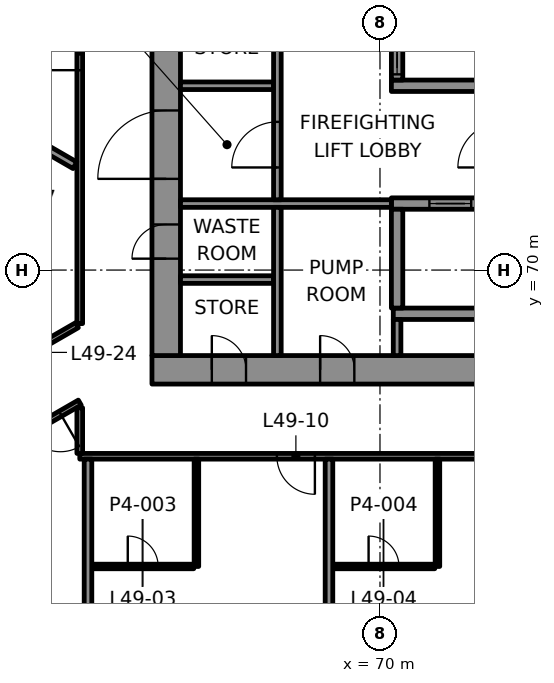
"""IFC4 building model, lengths in metres.
Left out: names, types, materials, properties, quantities, classifications, styles, units other than length and angle.
Written with IfcOpenShell. Run it as: python <this file> out.ifc"""

import sys

from ifc_helpers import new_model, si_unit, direction, frame, frame_2d, origin, place, context, subcontext, project, spatial, rectangle, extrude, element, fill, save


model = new_model("IFC4")
c1 = context("Model", 3, precision=1e-05, world=origin(), true_north=direction((0.0, 1.0)))
c2 = subcontext(c1, "Body", "Model", "MODEL_VIEW")
j1 = project(units=[si_unit("LENGTHUNIT", "METRE"), si_unit("PLANEANGLEUNIT", "RADIAN")], contexts=[c1])
p1 = place(None, origin())
s1 = spatial("IfcSite", under=j1, at=p1, CompositionType="ELEMENT")
p2 = place(p1, origin())
s2 = spatial("IfcBuilding", under=s1, at=p2, CompositionType="ELEMENT")
p3 = place(p2, frame((0.0, 0.0, 210.4)))
s3 = spatial("IfcBuildingStorey", under=s2, at=p3, CompositionType="ELEMENT", Elevation=210.4)
p4 = place(p3, frame((64.0, 67.375, 0.0), z_axis=(0.0, 0.0, 1.0), x_axis=(1.0, 0.0, 0.0)))
e1 = element("IfcWall", 1, at=p4, inside=s3, PredefinedType="SHEAR", context=c2, shape_type="SweptSolid", body=[
    extrude(rectangle(XDim=22.0, YDim=0.75, at=frame_2d((11.0, 0.0))), origin(), (0.0, 0.0, 1.0), 3.7),
])
p5 = place(p4, frame((1.575, 0.0, 0.0)))
e2 = element("IfcOpeningElement", 2, at=p5, cuts=e1, PredefinedType="OPENING", context=c2, shape_type="SweptSolid", body=[
    extrude(rectangle(XDim=0.9, YDim=2.1, at=frame_2d((0.45, 1.05))), frame((0.0, 0.385, 0.0), z_axis=(0.0, -1.0, 0.0), x_axis=(1.0, 0.0, 0.0)), (0.0, 0.0, 1.0), 0.77),
])
p6 = place(p4, frame((4.425, 0.0, 0.0)))
e3 = element("IfcOpeningElement", 3, at=p6, cuts=e1, PredefinedType="OPENING", context=c2, shape_type="SweptSolid", body=[
    extrude(rectangle(XDim=0.9, YDim=2.1, at=frame_2d((0.45, 1.05))), frame((0.0, 0.385, 0.0), z_axis=(0.0, -1.0, 0.0), x_axis=(1.0, 0.0, 0.0)), (0.0, 0.0, 1.0), 0.77),
])
p7 = place(p3, frame((64.375, 67.75, 0.0), z_axis=(0.0, 0.0, 1.0), x_axis=(0.0, 1.0, 0.0)))
e4 = element("IfcWall", 4, at=p7, inside=s3, PredefinedType="SHEAR", context=c2, shape_type="SweptSolid", body=[
    extrude(rectangle(XDim=14.5, YDim=0.75, at=frame_2d((7.25, 0.0))), origin(), (0.0, 0.0, 1.0), 3.7),
])
p8 = place(p7, frame((4.65, 0.0, 0.0)))
e5 = element("IfcOpeningElement", 5, at=p8, cuts=e4, PredefinedType="OPENING", context=c2, shape_type="SweptSolid", body=[
    extrude(rectangle(XDim=1.8, YDim=2.1, at=frame_2d((0.9, 1.05))), frame((0.0, 0.385, 0.0), z_axis=(0.0, -1.0, 0.0), x_axis=(1.0, 0.0, 0.0)), (0.0, 0.0, 1.0), 0.77),
])
p9 = place(p7, frame((2.55, 0.0, 0.0)))
e6 = element("IfcOpeningElement", 6, at=p9, cuts=e4, PredefinedType="OPENING", context=c2, shape_type="SweptSolid", body=[
    extrude(rectangle(XDim=0.9, YDim=2.1, at=frame_2d((0.45, 1.05))), frame((0.0, 0.385, 0.0), z_axis=(0.0, -1.0, 0.0), x_axis=(1.0, 0.0, 0.0)), (0.0, 0.0, 1.0), 0.77),
])
p10 = place(p7, frame((10.35, 0.0, 0.0)))
e7 = element("IfcOpeningElement", 7, at=p10, cuts=e4, PredefinedType="OPENING", context=c2, shape_type="SweptSolid", body=[
    extrude(rectangle(XDim=0.9, YDim=2.1, at=frame_2d((0.45, 1.05))), frame((0.0, 0.385, 0.0), z_axis=(0.0, -1.0, 0.0), x_axis=(1.0, 0.0, 0.0)), (0.0, 0.0, 1.0), 0.77),
])
p11 = place(p3, frame((70.35, 68.85, 0.0), z_axis=(0.0, 0.0, 1.0), x_axis=(1.0, 0.0, 0.0)))
e8 = element("IfcWall", 8, at=p11, inside=s3, PredefinedType="SHEAR", context=c2, shape_type="SweptSolid", body=[
    extrude(rectangle(XDim=14.2, YDim=0.3, at=frame_2d((7.1, 0.0))), origin(), (0.0, 0.0, 1.0), 3.7),
])
p12 = place(p3, frame((70.3, 71.75, 0.0), z_axis=(0.0, 0.0, 1.0), x_axis=(1.0, 0.0, 0.0)))
e9 = element("IfcWall", 9, at=p12, inside=s3, PredefinedType="SHEAR", context=c2, shape_type="SweptSolid", body=[
    extrude(rectangle(XDim=14.3, YDim=0.3, at=frame_2d((7.15, 0.0))), origin(), (0.0, 0.0, 1.0), 3.7),
])
p13 = place(p12, frame((1.0, 0.0, 0.0)))
e10 = element("IfcOpeningElement", 10, at=p13, cuts=e9, PredefinedType="OPENING", context=c2, shape_type="SweptSolid", body=[
    extrude(rectangle(XDim=1.1, YDim=2.1, at=frame_2d((0.55, 1.05))), frame((0.0, 0.16, 0.0), z_axis=(0.0, -1.0, 0.0), x_axis=(1.0, 0.0, 0.0)), (0.0, 0.0, 1.0), 0.32),
])
p14 = place(p12, frame((3.8, 0.0, 0.0)))
e11 = element("IfcOpeningElement", 11, at=p14, cuts=e9, PredefinedType="OPENING", context=c2, shape_type="SweptSolid", body=[
    extrude(rectangle(XDim=1.1, YDim=2.1, at=frame_2d((0.55, 1.05))), frame((0.0, 0.16, 0.0), z_axis=(0.0, -1.0, 0.0), x_axis=(1.0, 0.0, 0.0)), (0.0, 0.0, 1.0), 0.32),
])
p15 = place(p12, frame((6.6, 0.0, 0.0)))
e12 = element("IfcOpeningElement", 12, at=p15, cuts=e9, PredefinedType="OPENING", context=c2, shape_type="SweptSolid", body=[
    extrude(rectangle(XDim=1.1, YDim=2.1, at=frame_2d((0.55, 1.05))), frame((0.0, 0.16, 0.0), z_axis=(0.0, -1.0, 0.0), x_axis=(1.0, 0.0, 0.0)), (0.0, 0.0, 1.0), 0.32),
])
p16 = place(p12, frame((9.4, 0.0, 0.0)))
e13 = element("IfcOpeningElement", 13, at=p16, cuts=e9, PredefinedType="OPENING", context=c2, shape_type="SweptSolid", body=[
    extrude(rectangle(XDim=1.1, YDim=2.1, at=frame_2d((0.55, 1.05))), frame((0.0, 0.16, 0.0), z_axis=(0.0, -1.0, 0.0), x_axis=(1.0, 0.0, 0.0)), (0.0, 0.0, 1.0), 0.32),
])
p17 = place(p12, frame((12.2, 0.0, 0.0)))
e14 = element("IfcOpeningElement", 14, at=p17, cuts=e9, PredefinedType="OPENING", context=c2, shape_type="SweptSolid", body=[
    extrude(rectangle(XDim=1.1, YDim=2.1, at=frame_2d((0.55, 1.05))), frame((0.0, 0.16, 0.0), z_axis=(0.0, -1.0, 0.0), x_axis=(1.0, 0.0, 0.0)), (0.0, 0.0, 1.0), 0.32),
])
p18 = place(p3, frame((70.3, 74.85, 0.0), z_axis=(0.0, 0.0, 1.0), x_axis=(1.0, 0.0, 0.0)))
e15 = element("IfcWall", 15, at=p18, inside=s3, PredefinedType="SHEAR", context=c2, shape_type="SweptSolid", body=[
    extrude(rectangle(XDim=14.3, YDim=0.3, at=frame_2d((7.15, 0.0))), origin(), (0.0, 0.0, 1.0), 3.7),
])
p19 = place(p18, frame((3.8, 0.0, 0.0)))
e16 = element("IfcOpeningElement", 16, at=p19, cuts=e15, PredefinedType="OPENING", context=c2, shape_type="SweptSolid", body=[
    extrude(rectangle(XDim=1.1, YDim=2.1, at=frame_2d((0.55, 1.05))), frame((0.0, 0.16, 0.0), z_axis=(0.0, -1.0, 0.0), x_axis=(1.0, 0.0, 0.0)), (0.0, 0.0, 1.0), 0.32),
])
p20 = place(p18, frame((12.2, 0.0, 0.0)))
e17 = element("IfcOpeningElement", 17, at=p20, cuts=e15, PredefinedType="OPENING", context=c2, shape_type="SweptSolid", body=[
    extrude(rectangle(XDim=1.1, YDim=2.1, at=frame_2d((0.55, 1.05))), frame((0.0, 0.16, 0.0), z_axis=(0.0, -1.0, 0.0), x_axis=(1.0, 0.0, 0.0)), (0.0, 0.0, 1.0), 0.32),
])
p21 = place(p3, frame((70.45, 69.0, 0.0), z_axis=(0.0, 0.0, 1.0), x_axis=(0.0, 1.0, 0.0)))
e18 = element("IfcWall", 18, at=p21, inside=s3, PredefinedType="SHEAR", context=c2, shape_type="SweptSolid", body=[
    extrude(rectangle(XDim=2.6, YDim=0.3, at=frame_2d((1.3, 0.0))), origin(), (0.0, 0.0, 1.0), 3.7),
])
p22 = place(p3, frame((70.45, 75.0, 0.0), z_axis=(0.0, 0.0, 1.0), x_axis=(0.0, 1.0, 0.0)))
e19 = element("IfcWall", 19, at=p22, inside=s3, PredefinedType="SHEAR", context=c2, shape_type="SweptSolid", body=[
    extrude(rectangle(XDim=2.6, YDim=0.3, at=frame_2d((1.3, 0.0))), origin(), (0.0, 0.0, 1.0), 3.7),
])
p23 = place(p22, frame((0.15, 0.0, 0.0)))
e20 = element("IfcOpeningElement", 20, at=p23, cuts=e19, PredefinedType="OPENING", context=c2, shape_type="SweptSolid", body=[
    extrude(rectangle(XDim=1.1, YDim=2.1, at=frame_2d((0.55, 1.05))), frame((0.0, 0.16, 0.0), z_axis=(0.0, -1.0, 0.0), x_axis=(1.0, 0.0, 0.0)), (0.0, 0.0, 1.0), 0.32),
])
p24 = place(p3, frame((62.427, 62.2, 0.0), z_axis=(0.0, 0.0, 1.0), x_axis=(1.0, 0.0, 0.0)))
e21 = element("IfcWall", 21, at=p24, inside=s3, PredefinedType="PARTITIONING", context=c2, shape_type="SweptSolid", body=[
    extrude(rectangle(XDim=2.674, YDim=0.12, at=frame_2d((1.337, 0.0))), origin(), (0.0, 0.0, 1.0), 3.1),
])
p25 = place(p24, frame((0.937, 0.0, 0.0)))
e22 = element("IfcOpeningElement", 22, at=p25, cuts=e21, PredefinedType="OPENING", context=c2, shape_type="SweptSolid", body=[
    extrude(rectangle(XDim=0.8, YDim=2.1, at=frame_2d((0.4, 1.05))), frame((0.0, 0.07, 0.0), z_axis=(0.0, -1.0, 0.0), x_axis=(1.0, 0.0, 0.0)), (0.0, 0.0, 1.0), 0.14),
])
p26 = place(p3, frame((68.758, 62.2, 0.0), z_axis=(0.0, 0.0, 1.0), x_axis=(1.0, 0.0, 0.0)))
e23 = element("IfcWall", 23, at=p26, inside=s3, PredefinedType="PARTITIONING", context=c2, shape_type="SweptSolid", body=[
    extrude(rectangle(XDim=2.684, YDim=0.12, at=frame_2d((1.342, 0.0))), origin(), (0.0, 0.0, 1.0), 3.1),
])
p27 = place(p26, frame((0.942, 0.0, 0.0)))
e24 = element("IfcOpeningElement", 24, at=p27, cuts=e23, PredefinedType="OPENING", context=c2, shape_type="SweptSolid", body=[
    extrude(rectangle(XDim=0.8, YDim=2.1, at=frame_2d((0.4, 1.05))), frame((0.0, 0.07, 0.0), z_axis=(0.0, -1.0, 0.0), x_axis=(1.0, 0.0, 0.0)), (0.0, 0.0, 1.0), 0.14),
])
p28 = place(p3, frame((87.899, 65.1, 0.0), z_axis=(0.0, 0.0, 1.0), x_axis=(-1.0, 0.0, 0.0)))
e25 = element("IfcWall", 25, at=p28, inside=s3, PredefinedType="PARTITIONING", context=c2, shape_type="SweptSolid", body=[
    extrude(rectangle(XDim=25.799, YDim=0.15, at=frame_2d((12.899, 0.0))), origin(), (0.0, 0.0, 1.0), 3.1),
])
p29 = place(p28, frame((0.259, 0.0, 0.0)))
e26 = element("IfcOpeningElement", 26, at=p29, cuts=e25, PredefinedType="OPENING", context=c2, shape_type="SweptSolid", body=[
    extrude(rectangle(XDim=1.0, YDim=2.1, at=frame_2d((0.5, 1.05))), frame((0.0, 0.085, 0.0), z_axis=(0.0, -1.0, 0.0), x_axis=(1.0, 0.0, 0.0)), (0.0, 0.0, 1.0), 0.17),
])
p30 = place(p28, frame((4.641, 0.0, 0.0)))
e27 = element("IfcOpeningElement", 27, at=p30, cuts=e25, PredefinedType="OPENING", context=c2, shape_type="SweptSolid", body=[
    extrude(rectangle(XDim=1.0, YDim=2.1, at=frame_2d((0.5, 1.05))), frame((0.0, 0.085, 0.0), z_axis=(0.0, -1.0, 0.0), x_axis=(1.0, 0.0, 0.0)), (0.0, 0.0, 1.0), 0.17),
])
p31 = place(p28, frame((8.868, 0.0, 0.0)))
e28 = element("IfcOpeningElement", 28, at=p31, cuts=e25, PredefinedType="OPENING", context=c2, shape_type="SweptSolid", body=[
    extrude(rectangle(XDim=1.0, YDim=2.1, at=frame_2d((0.5, 1.05))), frame((0.0, 0.085, 0.0), z_axis=(0.0, -1.0, 0.0), x_axis=(1.0, 0.0, 0.0)), (0.0, 0.0, 1.0), 0.17),
])
p32 = place(p28, frame((13.271, 0.0, 0.0)))
e29 = element("IfcOpeningElement", 29, at=p32, cuts=e25, PredefinedType="OPENING", context=c2, shape_type="SweptSolid", body=[
    extrude(rectangle(XDim=1.0, YDim=2.1, at=frame_2d((0.5, 1.05))), frame((0.0, 0.085, 0.0), z_axis=(0.0, -1.0, 0.0), x_axis=(1.0, 0.0, 0.0)), (0.0, 0.0, 1.0), 0.17),
])
p33 = place(p28, frame((19.612, 0.0, 0.0)))
e30 = element("IfcOpeningElement", 30, at=p33, cuts=e25, PredefinedType="OPENING", context=c2, shape_type="SweptSolid", body=[
    extrude(rectangle(XDim=1.0, YDim=2.1, at=frame_2d((0.5, 1.05))), frame((0.0, 0.085, 0.0), z_axis=(0.0, -1.0, 0.0), x_axis=(1.0, 0.0, 0.0)), (0.0, 0.0, 1.0), 0.17),
])
p34 = place(p3, frame((62.1, 66.513, 0.0), z_axis=(0.0, 0.0, 1.0), x_axis=(-0.866025886419, -0.499999164051, 0.0)))
e31 = element("IfcWall", 31, at=p34, inside=s3, PredefinedType="PARTITIONING", context=c2, shape_type="SweptSolid", body=[
    extrude(rectangle(XDim=12.754, YDim=0.15, at=frame_2d((6.377, 0.0))), origin(), (0.0, 0.0, 1.0), 2.947),
])
p35 = place(p34, frame((0.587, 0.0, 0.0)))
e32 = element("IfcOpeningElement", 32, at=p35, cuts=e31, PredefinedType="OPENING", context=c2, shape_type="SweptSolid", body=[
    extrude(rectangle(XDim=1.0, YDim=2.1, at=frame_2d((0.5, 1.05))), frame((0.0, 0.085, 0.0), z_axis=(0.0, -1.0, 0.0), x_axis=(1.0, 0.0, 0.0)), (0.0, 0.0, 1.0), 0.17),
])
p36 = place(p34, frame((7.742, 0.0, 0.0)))
e33 = element("IfcOpeningElement", 33, at=p36, cuts=e31, PredefinedType="OPENING", context=c2, shape_type="SweptSolid", body=[
    extrude(rectangle(XDim=1.0, YDim=2.1, at=frame_2d((0.5, 1.05))), frame((0.0, 0.085, 0.0), z_axis=(0.0, -1.0, 0.0), x_axis=(1.0, 0.0, 0.0)), (0.0, 0.0, 1.0), 0.17),
])
p37 = place(p3, frame((50.155, 61.695, 0.0), z_axis=(0.0, 0.0, 1.0), x_axis=(0.8660236305, 0.500003071406, 0.0)))
e34 = element("IfcWall", 34, at=p37, inside=s3, PredefinedType="PARTITIONING", context=c2, shape_type="SweptSolid", body=[
    extrude(rectangle(XDim=13.707, YDim=0.15, at=frame_2d((6.853, 0.0))), origin(), (0.0, 0.0, 1.0), 3.1),
])
p38 = place(p37, frame((1.736, 0.0, 0.0)))
e35 = element("IfcOpeningElement", 35, at=p38, cuts=e34, PredefinedType="OPENING", context=c2, shape_type="SweptSolid", body=[
    extrude(rectangle(XDim=1.0, YDim=2.1, at=frame_2d((0.5, 1.05))), frame((0.0, 0.085, 0.0), z_axis=(0.0, -1.0, 0.0), x_axis=(1.0, 0.0, 0.0)), (0.0, 0.0, 1.0), 0.17),
])
p39 = place(p37, frame((11.777, 0.0, 0.0)))
e36 = element("IfcOpeningElement", 36, at=p39, cuts=e34, PredefinedType="OPENING", context=c2, shape_type="SweptSolid", body=[
    extrude(rectangle(XDim=1.0, YDim=2.1, at=frame_2d((0.5, 1.05))), frame((0.0, 0.085, 0.0), z_axis=(0.0, -1.0, 0.0), x_axis=(1.0, 0.0, 0.0)), (0.0, 0.0, 1.0), 0.17),
])
p40 = place(p3, frame((71.512, 62.2, 0.0), z_axis=(0.0, 0.0, 1.0), x_axis=(0.0, 1.0, 0.0)))
e37 = element("IfcWall", 37, at=p40, inside=s3, PredefinedType="PARTITIONING", context=c2, shape_type="SweptSolid", body=[
    extrude(rectangle(XDim=2.825, YDim=0.12, at=frame_2d((1.413, 0.0))), origin(), (0.0, 0.0, 1.0), 3.1),
])
p41 = place(p3, frame((68.658, 55.998, 0.0), z_axis=(0.0, 0.0, 1.0), x_axis=(0.0, 1.0, 0.0)))
e38 = element("IfcWall", 38, at=p41, inside=s3, PredefinedType="PARTITIONING", context=c2, shape_type="SweptSolid", body=[
    extrude(rectangle(XDim=9.027, YDim=0.2, at=frame_2d((4.514, 0.0))), origin(), (0.0, 0.0, 1.0), 3.022),
])
p42 = place(p3, frame((65.17, 62.2, 0.0), z_axis=(0.0, 0.0, 1.0), x_axis=(0.0, 1.0, 0.0)))
e39 = element("IfcWall", 39, at=p42, inside=s3, PredefinedType="PARTITIONING", context=c2, shape_type="SweptSolid", body=[
    extrude(rectangle(XDim=2.825, YDim=0.12, at=frame_2d((1.413, 0.0))), origin(), (0.0, 0.0, 1.0), 3.1),
])
p43 = place(p3, frame((62.317, 55.998, 0.0), z_axis=(0.0, 0.0, 1.0), x_axis=(0.0, 1.0, 0.0)))
e40 = element("IfcWall", 40, at=p43, inside=s3, PredefinedType="PARTITIONING", context=c2, shape_type="SweptSolid", body=[
    extrude(rectangle(XDim=9.027, YDim=0.2, at=frame_2d((4.514, 0.0))), origin(), (0.0, 0.0, 1.0), 3.022),
])
p44 = place(p3, frame((62.1, 65.176, 0.0), z_axis=(0.0, 0.0, 1.0), x_axis=(0.0, 1.0, 0.0)))
e41 = element("IfcWall", 41, at=p44, inside=s3, PredefinedType="PARTITIONING", context=c2, shape_type="SweptSolid", body=[
    extrude(rectangle(XDim=1.201, YDim=0.15, at=frame_2d((0.6, 0.0))), origin(), (0.0, 0.0, 1.0), 2.947),
])
p45 = place(p3, frame((62.1, 68.591, 0.0), z_axis=(0.0, 0.0, 1.0), x_axis=(0.0, 1.0, 0.0)))
e42 = element("IfcWall", 42, at=p45, inside=s3, PredefinedType="PARTITIONING", context=c2, shape_type="SweptSolid", body=[
    extrude(rectangle(XDim=16.309, YDim=0.15, at=frame_2d((8.154, 0.0))), origin(), (0.0, 0.0, 1.0), 3.1),
])
p46 = place(p45, frame((6.668, 0.0, 0.0)))
e43 = element("IfcOpeningElement", 43, at=p46, cuts=e42, PredefinedType="OPENING", context=c2, shape_type="SweptSolid", body=[
    extrude(rectangle(XDim=1.0, YDim=2.1, at=frame_2d((0.5, 1.05))), frame((0.0, 0.085, 0.0), z_axis=(0.0, -1.0, 0.0), x_axis=(1.0, 0.0, 0.0)), (0.0, 0.0, 1.0), 0.17),
])
p47 = place(p45, frame((13.991, 0.0, 0.0)))
e44 = element("IfcOpeningElement", 44, at=p47, cuts=e42, PredefinedType="OPENING", context=c2, shape_type="SweptSolid", body=[
    extrude(rectangle(XDim=1.0, YDim=2.1, at=frame_2d((0.5, 1.05))), frame((0.0, 0.085, 0.0), z_axis=(0.0, -1.0, 0.0), x_axis=(1.0, 0.0, 0.0)), (0.0, 0.0, 1.0), 0.17),
])
p48 = place(p3, frame((61.973, 72.757, 0.0), z_axis=(0.0, 0.0, 1.0), x_axis=(-0.866027278279, 0.499996753267, 0.0)))
e45 = element("IfcWall", 45, at=p48, inside=s3, PredefinedType="PARTITIONING", context=c2, shape_type="SweptSolid", body=[
    extrude(rectangle(XDim=7.242, YDim=0.2, at=frame_2d((3.621, 0.0))), origin(), (0.0, 0.0, 1.0), 3.1),
])
p49 = place(p3, frame((64.75, 69.75, 0.0), z_axis=(0.0, 0.0, 1.0), x_axis=(1.0, 0.0, 0.0)))
e46 = element("IfcWall", 46, at=p49, inside=s3, PredefinedType="PARTITIONING", context=c2, shape_type="SweptSolid", body=[
    extrude(rectangle(XDim=2.45, YDim=0.2, at=frame_2d((1.225, 0.0))), origin(), (0.0, 0.0, 1.0), 3.7),
])
p50 = place(p3, frame((64.75, 71.75, 0.0), z_axis=(0.0, 0.0, 1.0), x_axis=(1.0, 0.0, 0.0)))
e47 = element("IfcWall", 47, at=p50, inside=s3, PredefinedType="PARTITIONING", context=c2, shape_type="SweptSolid", body=[
    extrude(rectangle(XDim=5.55, YDim=0.2, at=frame_2d((2.775, 0.0))), origin(), (0.0, 0.0, 1.0), 3.7),
])
p51 = place(p3, frame((64.75, 74.85, 0.0), z_axis=(0.0, 0.0, 1.0), x_axis=(1.0, 0.0, 0.0)))
e48 = element("IfcWall", 48, at=p51, inside=s3, PredefinedType="PARTITIONING", context=c2, shape_type="SweptSolid", body=[
    extrude(rectangle(XDim=2.45, YDim=0.2, at=frame_2d((1.225, 0.0))), origin(), (0.0, 0.0, 1.0), 3.7),
])
p52 = place(p3, frame((67.3, 67.75, 0.0), z_axis=(0.0, 0.0, 1.0), x_axis=(0.0, 1.0, 0.0)))
e49 = element("IfcWall", 49, at=p52, inside=s3, PredefinedType="PARTITIONING", context=c2, shape_type="SweptSolid", body=[
    extrude(rectangle(XDim=3.9, YDim=0.2, at=frame_2d((1.95, 0.0))), origin(), (0.0, 0.0, 1.0), 3.7),
])
p53 = place(p3, frame((67.3, 71.85, 0.0), z_axis=(0.0, 0.0, 1.0), x_axis=(0.0, 1.0, 0.0)))
e50 = element("IfcWall", 50, at=p53, inside=s3, PredefinedType="PARTITIONING", context=c2, shape_type="SweptSolid", body=[
    extrude(rectangle(XDim=5.75, YDim=0.2, at=frame_2d((2.875, 0.0))), origin(), (0.0, 0.0, 1.0), 3.7),
])
p54 = place(p53, frame((0.85, 0.0, 0.0)))
e51 = element("IfcOpeningElement", 51, at=p54, cuts=e50, PredefinedType="OPENING", context=c2, shape_type="SweptSolid", body=[
    extrude(rectangle(XDim=1.2, YDim=2.1, at=frame_2d((0.6, 1.05))), frame((0.0, 0.11, 0.0), z_axis=(0.0, -1.0, 0.0), x_axis=(1.0, 0.0, 0.0)), (0.0, 0.0, 1.0), 0.22),
])
p55 = place(p3, frame((70.45, 67.75, 0.0), z_axis=(0.0, 0.0, 1.0), x_axis=(0.0, 1.0, 0.0)))
e52 = element("IfcWall", 52, at=p55, inside=s3, PredefinedType="PARTITIONING", context=c2, shape_type="SweptSolid", body=[
    extrude(rectangle(XDim=0.95, YDim=0.2, at=frame_2d((0.475, 0.0))), origin(), (0.0, 0.0, 1.0), 3.7),
])
p56 = place(p25, origin())
e53 = element("IfcDoor", 53, at=p56, inside=s3, OperationType="SINGLE_SWING_RIGHT", PredefinedType="DOOR", context=c2, shape_type="SweptSolid", body=[
    extrude(rectangle(XDim=0.8, YDim=2.1, at=frame_2d((0.4, 1.05))), frame((0.0, 0.025, 0.0), z_axis=(0.0, -1.0, 0.0), x_axis=(1.0, 0.0, 0.0)), (0.0, 0.0, 1.0), 0.05),
])
fill(e22, e53)
p57 = place(p27, origin())
e54 = element("IfcDoor", 54, at=p57, inside=s3, OperationType="SINGLE_SWING_RIGHT", PredefinedType="DOOR", context=c2, shape_type="SweptSolid", body=[
    extrude(rectangle(XDim=0.8, YDim=2.1, at=frame_2d((0.4, 1.05))), frame((0.0, 0.025, 0.0), z_axis=(0.0, -1.0, 0.0), x_axis=(1.0, 0.0, 0.0)), (0.0, 0.0, 1.0), 0.05),
])
fill(e24, e54)
p58 = place(p33, origin())
e55 = element("IfcDoor", 55, at=p58, inside=s3, OperationType="SINGLE_SWING_RIGHT", PredefinedType="DOOR", context=c2, shape_type="SweptSolid", body=[
    extrude(rectangle(XDim=1.0, YDim=2.1, at=frame_2d((0.5, 1.05))), frame((0.0, 0.025, 0.0), z_axis=(0.0, -1.0, 0.0), x_axis=(1.0, 0.0, 0.0)), (0.0, 0.0, 1.0), 0.05),
])
fill(e30, e55)
p59 = place(p35, origin())
e56 = element("IfcDoor", 56, at=p59, inside=s3, OperationType="SINGLE_SWING_RIGHT", PredefinedType="DOOR", context=c2, shape_type="SweptSolid", body=[
    extrude(rectangle(XDim=1.0, YDim=2.1, at=frame_2d((0.5, 1.05))), frame((0.0, 0.025, 0.0), z_axis=(0.0, -1.0, 0.0), x_axis=(1.0, 0.0, 0.0)), (0.0, 0.0, 1.0), 0.05),
])
fill(e32, e56)
p60 = place(p46, origin())
e57 = element("IfcDoor", 57, at=p60, inside=s3, OperationType="SINGLE_SWING_RIGHT", PredefinedType="DOOR", context=c2, shape_type="SweptSolid", body=[
    extrude(rectangle(XDim=1.0, YDim=2.1, at=frame_2d((0.5, 1.05))), frame((0.0, 0.025, 0.0), z_axis=(0.0, -1.0, 0.0), x_axis=(1.0, 0.0, 0.0)), (0.0, 0.0, 1.0), 0.05),
])
fill(e43, e57)
p61 = place(p13, origin())
e58 = element("IfcDoor", 58, at=p61, inside=s3, OperationType="DOUBLE_DOOR_SLIDING", PredefinedType="DOOR", context=c2, shape_type="SweptSolid", body=[
    extrude(rectangle(XDim=1.1, YDim=2.1, at=frame_2d((0.55, 1.05))), frame((0.0, 0.025, 0.0), z_axis=(0.0, -1.0, 0.0), x_axis=(1.0, 0.0, 0.0)), (0.0, 0.0, 1.0), 0.05),
])
fill(e10, e58)
p62 = place(p23, origin())
e59 = element("IfcDoor", 59, at=p62, inside=s3, OperationType="DOUBLE_DOOR_SLIDING", PredefinedType="DOOR", context=c2, shape_type="SweptSolid", body=[
    extrude(rectangle(XDim=1.1, YDim=2.1, at=frame_2d((0.55, 1.05))), frame((0.0, 0.025, 0.0), z_axis=(0.0, -1.0, 0.0), x_axis=(1.0, 0.0, 0.0)), (0.0, 0.0, 1.0), 0.05),
])
fill(e20, e59)
p63 = place(p54, origin())
e60 = element("IfcDoor", 60, at=p63, inside=s3, OperationType="SINGLE_SWING_RIGHT", PredefinedType="DOOR", context=c2, shape_type="SweptSolid", body=[
    extrude(rectangle(XDim=1.2, YDim=2.1, at=frame_2d((0.6, 1.05))), frame((0.0, 0.025, 0.0), z_axis=(0.0, -1.0, 0.0), x_axis=(1.0, 0.0, 0.0)), (0.0, 0.0, 1.0), 0.05),
])
fill(e51, e60)
p64 = place(p8, origin())
e61 = element("IfcDoor", 61, at=p64, inside=s3, OperationType="SINGLE_SWING_LEFT", PredefinedType="DOOR", context=c2, shape_type="SweptSolid", body=[
    extrude(rectangle(XDim=1.8, YDim=2.1, at=frame_2d((0.9, 1.05))), frame((0.0, 0.095, 0.0), z_axis=(0.0, -1.0, 0.0), x_axis=(1.0, 0.0, 0.0)), (0.0, 0.0, 1.0), 0.19),
])
fill(e5, e61)
p65 = place(p5, origin())
e62 = element("IfcDoor", 62, at=p65, inside=s3, OperationType="SINGLE_SWING_LEFT", PredefinedType="DOOR", context=c2, shape_type="SweptSolid", body=[
    extrude(rectangle(XDim=0.9, YDim=2.1, at=frame_2d((0.45, 1.05))), frame((0.0, 0.095, 0.0), z_axis=(0.0, -1.0, 0.0), x_axis=(1.0, 0.0, 0.0)), (0.0, 0.0, 1.0), 0.19),
])
fill(e2, e62)
p66 = place(p9, origin())
e63 = element("IfcDoor", 63, at=p66, inside=s3, OperationType="SINGLE_SWING_RIGHT", PredefinedType="DOOR", context=c2, shape_type="SweptSolid", body=[
    extrude(rectangle(XDim=0.9, YDim=2.1, at=frame_2d((0.45, 1.05))), frame((0.0, 0.095, 0.0), z_axis=(0.0, -1.0, 0.0), x_axis=(1.0, 0.0, 0.0)), (0.0, 0.0, 1.0), 0.19),
])
fill(e6, e63)
p67 = place(p6, origin())
e64 = element("IfcDoor", 64, at=p67, inside=s3, OperationType="SINGLE_SWING_LEFT", PredefinedType="DOOR", context=c2, shape_type="SweptSolid", body=[
    extrude(rectangle(XDim=0.9, YDim=2.1, at=frame_2d((0.45, 1.05))), frame((0.0, 0.095, 0.0), z_axis=(0.0, -1.0, 0.0), x_axis=(1.0, 0.0, 0.0)), (0.0, 0.0, 1.0), 0.19),
])
fill(e3, e64)
save(model, sys.argv[1])
